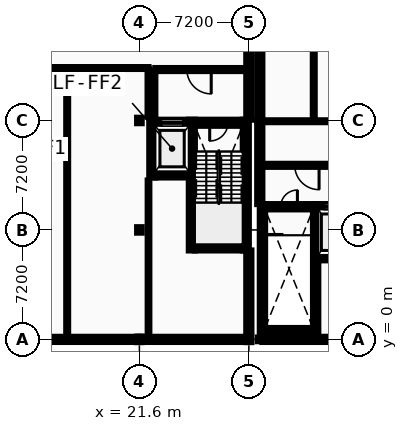
"""IFC4 building model, lengths in metres.
Left out: names, types, materials, properties, quantities, classifications, styles, units other than length and angle.
Written with IfcOpenShell. Run it as: python <this file> out.ifc"""

import sys

from ifc_helpers import new_model, si_unit, direction, frame, frame_2d, origin, origin_2d, place, context, subcontext, project, spatial, rectangle, i_section, extrude, element, fill, save


model = new_model("IFC4")
c1 = context("Model", 3, precision=1e-05, world=origin(), true_north=direction((0.0, 1.0)))
c2 = subcontext(c1, "Body", "Model", "MODEL_VIEW")
j1 = project(units=[si_unit("LENGTHUNIT", "METRE"), si_unit("PLANEANGLEUNIT", "RADIAN")], contexts=[c1])
p1 = place(None, origin())
s1 = spatial("IfcSite", under=j1, at=p1, CompositionType="ELEMENT")
p2 = place(p1, origin())
s2 = spatial("IfcBuilding", under=s1, at=p2, CompositionType="ELEMENT")
p3 = place(p2, frame((0.0, 0.0, 18.4)))
s3 = spatial("IfcBuildingStorey", under=s2, at=p3, CompositionType="ELEMENT", Elevation=18.4)
for number, where, z_axis, x_axis in (
    (1, (21.6, 0.0, 0.0), (0.0, 0.0, 1.0), (1.0, 0.0, 0.0)),
    (2, (21.6, 7.2, 0.0), (0.0, 0.0, 1.0), (1.0, 0.0, 0.0)),
    (3, (21.6, 14.4, 0.0), (0.0, 0.0, 1.0), (1.0, 0.0, 0.0)),
    (4, (28.8, 0.0, 0.0), (0.0, 0.0, 1.0), (1.0, 0.0, 0.0)),
):
    element("IfcColumn", number, at=place(p3, frame(where, z_axis=z_axis, x_axis=x_axis)), inside=s3, PredefinedType="COLUMN", context=c2, shape_type="SweptSolid", body=[
        extrude(i_section(OverallWidth=0.3, OverallDepth=0.36, WebThickness=0.012, FlangeThickness=0.022, FilletRadius=0.027, at=origin_2d()), origin(), (0.0, 0.0, 1.0), 4.4),
    ])
for number, where, z_axis, x_axis in (
    (5, (29.52, 0.0, 0.0), (0.0, 0.0, 1.0), (1.0, 0.0, 0.0)),
    (6, (29.52, 14.4, 0.0), (0.0, 0.0, 1.0), (1.0, 0.0, 0.0)),
):
    element("IfcColumn", number, at=place(p3, frame(where, z_axis=z_axis, x_axis=x_axis)), inside=s3, PredefinedType="COLUMN", context=c2, shape_type="SweptSolid", body=[
        extrude(i_section(OverallWidth=0.24, OverallDepth=0.24, WebThickness=0.01, FlangeThickness=0.017, FilletRadius=0.021, at=origin_2d()), origin(), (0.0, 0.0, 1.0), 4.4),
    ])
p4 = place(p3, frame((14.4, 0.0, 0.0), z_axis=(0.0, 0.0, 1.0), x_axis=(1.0, 0.0, 0.0)))
e7 = element("IfcWall", 7, at=p4, inside=s3, PredefinedType="STANDARD", context=c2, shape_type="SweptSolid", body=[
    extrude(rectangle(XDim=7.2, YDim=0.34, at=frame_2d((3.6, 0.0))), origin(), (0.0, 0.0, 1.0), 3.95),
])
p5 = place(p4, frame((4.44, 0.0, 0.95)))
e8 = element("IfcOpeningElement", 8, at=p5, cuts=e7, PredefinedType="OPENING", context=c2, shape_type="SweptSolid", body=[
    extrude(rectangle(XDim=1.2, YDim=1.368, at=frame_2d((0.6, 0.684))), frame((0.0, 0.18, 0.0), z_axis=(0.0, -1.0, 0.0), x_axis=(1.0, 0.0, 0.0)), (0.0, 0.0, 1.0), 0.36),
])
p6 = place(p3, frame((21.6, 0.0, 0.0), z_axis=(0.0, 0.0, 1.0), x_axis=(1.0, 0.0, 0.0)))
e9 = element("IfcWall", 9, at=p6, inside=s3, PredefinedType="STANDARD", context=c2, shape_type="SweptSolid", body=[
    extrude(rectangle(XDim=7.03, YDim=0.34, at=frame_2d((3.515, 0.0))), origin(), (0.0, 0.0, 1.0), 3.95),
])
p7 = place(p6, frame((1.492, 0.0, 0.95)))
e10 = element("IfcOpeningElement", 10, at=p7, cuts=e9, PredefinedType="OPENING", context=c2, shape_type="SweptSolid", body=[
    extrude(rectangle(XDim=1.234, YDim=1.368, at=frame_2d((0.617, 0.684))), frame((0.0, 0.18, 0.0), z_axis=(0.0, -1.0, 0.0), x_axis=(1.0, 0.0, 0.0)), (0.0, 0.0, 1.0), 0.36),
])
p8 = place(p6, frame((4.304, 0.0, 0.95)))
e11 = element("IfcOpeningElement", 11, at=p8, cuts=e9, PredefinedType="OPENING", context=c2, shape_type="SweptSolid", body=[
    extrude(rectangle(XDim=1.234, YDim=1.368, at=frame_2d((0.617, 0.684))), frame((0.0, 0.18, 0.0), z_axis=(0.0, -1.0, 0.0), x_axis=(1.0, 0.0, 0.0)), (0.0, 0.0, 1.0), 0.36),
])
p9 = place(p3, frame((28.8, -0.17, 0.0), z_axis=(0.0, 0.0, 1.0), x_axis=(0.0, 1.0, 0.0)))
e12 = element("IfcWall", 12, at=p9, inside=s3, PredefinedType="STANDARD", context=c2, shape_type="SweptSolid", body=[
    extrude(rectangle(XDim=6.02, YDim=0.34, at=frame_2d((3.01, 0.0))), origin(), (0.0, 0.0, 1.0), 4.215),
])
p10 = place(p9, frame((2.461, 0.0, 0.95)))
e13 = element("IfcOpeningElement", 13, at=p10, cuts=e12, PredefinedType="OPENING", context=c2, shape_type="SweptSolid", body=[
    extrude(rectangle(XDim=1.098, YDim=1.404, at=frame_2d((0.549, 0.702))), frame((0.0, 0.18, 0.0), z_axis=(0.0, -1.0, 0.0), x_axis=(1.0, 0.0, 0.0)), (0.0, 0.0, 1.0), 0.36),
])
p11 = place(p3, frame((28.8, 14.45, 0.0), z_axis=(0.0, 0.0, 1.0), x_axis=(0.0, 1.0, 0.0)))
e14 = element("IfcWall", 14, at=p11, inside=s3, PredefinedType="STANDARD", context=c2, shape_type="SweptSolid", body=[
    extrude(rectangle(XDim=7.15, YDim=0.34, at=frame_2d((3.575, 0.0))), origin(), (0.0, 0.0, 1.0), 4.215),
])
p12 = place(p11, frame((1.579, 0.0, 0.95)))
e15 = element("IfcOpeningElement", 15, at=p12, cuts=e14, PredefinedType="OPENING", context=c2, shape_type="SweptSolid", body=[
    extrude(rectangle(XDim=1.132, YDim=1.404, at=frame_2d((0.566, 0.702))), frame((0.0, 0.18, 0.0), z_axis=(0.0, -1.0, 0.0), x_axis=(1.0, 0.0, 0.0)), (0.0, 0.0, 1.0), 0.36),
])
p13 = place(p11, frame((4.439, 0.0, 0.95)))
e16 = element("IfcOpeningElement", 16, at=p13, cuts=e14, PredefinedType="OPENING", context=c2, shape_type="SweptSolid", body=[
    extrude(rectangle(XDim=1.132, YDim=1.404, at=frame_2d((0.566, 0.702))), frame((0.0, 0.18, 0.0), z_axis=(0.0, -1.0, 0.0), x_axis=(1.0, 0.0, 0.0)), (0.0, 0.0, 1.0), 0.36),
])
p14 = place(p3, frame((29.69, 0.0, 0.0), z_axis=(0.0, 0.0, 1.0), x_axis=(1.0, 0.0, 0.0)))
e17 = element("IfcWall", 17, at=p14, inside=s3, PredefinedType="STANDARD", context=c2, shape_type="SweptSolid", body=[
    extrude(rectangle(XDim=6.42, YDim=0.34, at=frame_2d((3.21, 0.0))), origin(), (0.0, 0.0, 1.0), 4.035),
])
p15 = place(p3, frame((29.52, 14.4, 0.0), z_axis=(0.0, 0.0, 1.0), x_axis=(0.0, -1.0, 0.0)))
e18 = element("IfcWall", 18, at=p15, inside=s3, PredefinedType="STANDARD", context=c2, shape_type="SweptSolid", body=[
    extrude(rectangle(XDim=5.5, YDim=0.34, at=frame_2d((2.75, 0.0))), origin(), (0.0, 0.0, 1.0), 4.11),
])
p16 = place(p3, frame((29.52, 21.77, 0.0), z_axis=(0.0, 0.0, 1.0), x_axis=(0.0, -1.0, 0.0)))
e19 = element("IfcWall", 19, at=p16, inside=s3, PredefinedType="STANDARD", context=c2, shape_type="SweptSolid", body=[
    extrude(rectangle(XDim=7.37, YDim=0.34, at=frame_2d((3.685, 0.0))), origin(), (0.0, 0.0, 1.0), 4.11),
])
p17 = place(p16, frame((1.577, 0.0, 0.95)))
e20 = element("IfcOpeningElement", 20, at=p17, cuts=e19, PredefinedType="OPENING", context=c2, shape_type="SweptSolid", body=[
    extrude(rectangle(XDim=1.268, YDim=1.404, at=frame_2d((0.634, 0.702))), frame((0.0, 0.18, 0.0), z_axis=(0.0, -1.0, 0.0), x_axis=(1.0, 0.0, 0.0)), (0.0, 0.0, 1.0), 0.36),
])
p18 = place(p16, frame((4.525, 0.0, 0.95)))
e21 = element("IfcOpeningElement", 21, at=p18, cuts=e19, PredefinedType="OPENING", context=c2, shape_type="SweptSolid", body=[
    extrude(rectangle(XDim=1.268, YDim=1.404, at=frame_2d((0.634, 0.702))), frame((0.0, 0.18, 0.0), z_axis=(0.0, -1.0, 0.0), x_axis=(1.0, 0.0, 0.0)), (0.0, 0.0, 1.0), 0.36),
])
p19 = place(p3, frame((25.25, 6.05, 0.0), z_axis=(0.0, 0.0, 1.0), x_axis=(1.0, 0.0, 0.0)))
e22 = element("IfcWall", 22, at=p19, inside=s3, PredefinedType="SHEAR", context=c2, shape_type="SweptSolid", body=[
    extrude(rectangle(XDim=3.15, YDim=0.4, at=frame_2d((1.575, 0.0))), origin(), (0.0, 0.0, 1.0), 4.215),
])
p20 = place(p3, frame((25.25, 14.25, 0.0), z_axis=(0.0, 0.0, 1.0), x_axis=(1.0, 0.0, 0.0)))
e23 = element("IfcWall", 23, at=p20, inside=s3, PredefinedType="SHEAR", context=c2, shape_type="SweptSolid", body=[
    extrude(rectangle(XDim=3.15, YDim=0.4, at=frame_2d((1.575, 0.0))), origin(), (0.0, 0.0, 1.0), 4.215),
])
p21 = place(p20, frame((0.975, 0.0, 0.0)))
e24 = element("IfcOpeningElement", 24, at=p21, cuts=e23, PredefinedType="OPENING", context=c2, shape_type="SweptSolid", body=[
    extrude(rectangle(XDim=1.2, YDim=2.15, at=frame_2d((0.6, 1.075))), frame((0.0, 0.21, 0.0), z_axis=(0.0, -1.0, 0.0), x_axis=(1.0, 0.0, 0.0)), (0.0, 0.0, 1.0), 0.42),
])
for number, where, z_axis, x_axis in (
    (25, (25.05, 5.85, 0.0), (0.0, 0.0, 1.0), (0.0, 1.0, 0.0)),
    (26, (28.6, 5.85, 0.0), (0.0, 0.0, 1.0), (0.0, 1.0, 0.0)),
):
    element("IfcWall", number, at=place(p3, frame(where, z_axis=z_axis, x_axis=x_axis)), inside=s3, PredefinedType="SHEAR", context=c2, shape_type="SweptSolid", body=[
        extrude(rectangle(XDim=8.6, YDim=0.4, at=frame_2d((4.3, 0.0))), origin(), (0.0, 0.0, 1.0), 4.215),
    ])
p22 = place(p3, frame((22.65, 10.85, 0.0), z_axis=(0.0, 0.0, 1.0), x_axis=(1.0, 0.0, 0.0)))
e27 = element("IfcWall", 27, at=p22, inside=s3, PredefinedType="SHEAR", context=c2, shape_type="SweptSolid", body=[
    extrude(rectangle(XDim=2.2, YDim=0.4, at=frame_2d((1.1, 0.0))), origin(), (0.0, 0.0, 1.0), 4.215),
])
p23 = place(p3, frame((22.65, 14.25, 0.0), z_axis=(0.0, 0.0, 1.0), x_axis=(1.0, 0.0, 0.0)))
e28 = element("IfcWall", 28, at=p23, inside=s3, PredefinedType="SHEAR", context=c2, shape_type="SweptSolid", body=[
    extrude(rectangle(XDim=2.2, YDim=0.4, at=frame_2d((1.1, 0.0))), origin(), (0.0, 0.0, 1.0), 4.215),
])
p24 = place(p23, frame((0.4, 0.0, 0.0)))
e29 = element("IfcOpeningElement", 29, at=p24, cuts=e28, PredefinedType="OPENING", context=c2, shape_type="SweptSolid", body=[
    extrude(rectangle(XDim=1.4, YDim=2.2, at=frame_2d((0.7, 1.1))), frame((0.0, 0.21, 0.0), z_axis=(0.0, -1.0, 0.0), x_axis=(1.0, 0.0, 0.0)), (0.0, 0.0, 1.0), 0.42),
])
p25 = place(p3, frame((22.45, 10.65, 0.0), z_axis=(0.0, 0.0, 1.0), x_axis=(0.0, 1.0, 0.0)))
e30 = element("IfcWall", 30, at=p25, inside=s3, PredefinedType="SHEAR", context=c2, shape_type="SweptSolid", body=[
    extrude(rectangle(XDim=3.8, YDim=0.4, at=frame_2d((1.9, 0.0))), origin(), (0.0, 0.0, 1.0), 4.215),
])
p26 = place(p3, frame((22.65, 17.75, 0.0), z_axis=(0.0, 0.0, 1.0), x_axis=(1.0, 0.0, 0.0)))
e31 = element("IfcWall", 31, at=p26, inside=s3, PredefinedType="PARTITIONING", context=c2, shape_type="SweptSolid", body=[
    extrude(rectangle(XDim=5.75, YDim=0.2, at=frame_2d((2.875, 0.0))), origin(), (0.0, 0.0, 1.0), 4.215),
])
p27 = place(p26, frame((2.075, 0.0, 0.0)))
e32 = element("IfcOpeningElement", 32, at=p27, cuts=e31, PredefinedType="OPENING", context=c2, shape_type="SweptSolid", body=[
    extrude(rectangle(XDim=1.6, YDim=2.2, at=frame_2d((0.8, 1.1))), frame((0.0, 0.11, 0.0), z_axis=(0.0, -1.0, 0.0), x_axis=(1.0, 0.0, 0.0)), (0.0, 0.0, 1.0), 0.22),
])
p28 = place(p3, frame((22.55, 14.45, 0.0), z_axis=(0.0, 0.0, 1.0), x_axis=(0.0, 1.0, 0.0)))
e33 = element("IfcWall", 33, at=p28, inside=s3, PredefinedType="PARTITIONING", context=c2, shape_type="SweptSolid", body=[
    extrude(rectangle(XDim=3.2, YDim=0.2, at=frame_2d((1.6, 0.0))), origin(), (0.0, 0.0, 1.0), 4.215),
])
p29 = place(p3, frame((29.87, 0.575, 0.0), z_axis=(0.0, 0.0, 1.0), x_axis=(1.0, 0.0, 0.0)))
e34 = element("IfcWall", 34, at=p29, inside=s3, PredefinedType="SHEAR", context=c2, shape_type="SweptSolid", body=[
    extrude(rectangle(XDim=3.15, YDim=0.35, at=frame_2d((1.575, 0.0))), origin(), (0.0, 0.0, 1.0), 4.18),
])
p30 = place(p3, frame((29.87, 8.725, 0.0), z_axis=(0.0, 0.0, 1.0), x_axis=(1.0, 0.0, 0.0)))
e35 = element("IfcWall", 35, at=p30, inside=s3, PredefinedType="SHEAR", context=c2, shape_type="SweptSolid", body=[
    extrude(rectangle(XDim=3.15, YDim=0.35, at=frame_2d((1.575, 0.0))), origin(), (0.0, 0.0, 1.0), 4.18),
])
p31 = place(p30, frame((1.025, 0.0, 0.0)))
e36 = element("IfcOpeningElement", 36, at=p31, cuts=e35, PredefinedType="OPENING", context=c2, shape_type="SweptSolid", body=[
    extrude(rectangle(XDim=1.1, YDim=2.15, at=frame_2d((0.55, 1.075))), frame((0.0, 0.185, 0.0), z_axis=(0.0, -1.0, 0.0), x_axis=(1.0, 0.0, 0.0)), (0.0, 0.0, 1.0), 0.37),
])
p32 = place(p3, frame((29.695, 0.34, 0.0), z_axis=(0.0, 0.0, 1.0), x_axis=(0.0, 1.0, 0.0)))
e37 = element("IfcWall", 37, at=p32, inside=s3, PredefinedType="SHEAR", context=c2, shape_type="SweptSolid", body=[
    extrude(rectangle(XDim=8.56, YDim=0.35, at=frame_2d((4.28, 0.0))), origin(), (0.0, 0.0, 1.0), 4.18),
])
p33 = place(p3, frame((33.195, 0.4, 0.0), z_axis=(0.0, 0.0, 1.0), x_axis=(0.0, 1.0, 0.0)))
e38 = element("IfcWall", 38, at=p33, inside=s3, PredefinedType="SHEAR", context=c2, shape_type="SweptSolid", body=[
    extrude(rectangle(XDim=8.5, YDim=0.35, at=frame_2d((4.25, 0.0))), origin(), (0.0, 0.0, 1.0), 4.18),
])
p34 = place(p3, frame((33.37, 5.375, 0.0), z_axis=(0.0, 0.0, 1.0), x_axis=(1.0, 0.0, 0.0)))
e39 = element("IfcWall", 39, at=p34, inside=s3, PredefinedType="SHEAR", context=c2, shape_type="SweptSolid", body=[
    extrude(rectangle(XDim=2.0, YDim=0.35, at=frame_2d((1.0, 0.0))), origin(), (0.0, 0.0, 1.0), 4.18),
])
p35 = place(p3, frame((33.37, 8.725, 0.0), z_axis=(0.0, 0.0, 1.0), x_axis=(1.0, 0.0, 0.0)))
e40 = element("IfcWall", 40, at=p35, inside=s3, PredefinedType="SHEAR", context=c2, shape_type="SweptSolid", body=[
    extrude(rectangle(XDim=2.0, YDim=0.35, at=frame_2d((1.0, 0.0))), origin(), (0.0, 0.0, 1.0), 4.18),
])
p36 = place(p35, frame((0.4, 0.0, 0.0)))
e41 = element("IfcOpeningElement", 41, at=p36, cuts=e40, PredefinedType="OPENING", context=c2, shape_type="SweptSolid", body=[
    extrude(rectangle(XDim=1.2, YDim=2.2, at=frame_2d((0.6, 1.1))), frame((0.0, 0.185, 0.0), z_axis=(0.0, -1.0, 0.0), x_axis=(1.0, 0.0, 0.0)), (0.0, 0.0, 1.0), 0.37),
])
p37 = place(p3, frame((29.87, 11.45, 0.0), z_axis=(0.0, 0.0, 1.0), x_axis=(1.0, 0.0, 0.0)))
e42 = element("IfcWall", 42, at=p37, inside=s3, PredefinedType="PARTITIONING", context=c2, shape_type="SweptSolid", body=[
    extrude(rectangle(XDim=5.5, YDim=0.2, at=frame_2d((2.75, 0.0))), origin(), (0.0, 0.0, 1.0), 4.18),
])
p38 = place(p37, frame((1.95, 0.0, 0.0)))
e43 = element("IfcOpeningElement", 43, at=p38, cuts=e42, PredefinedType="OPENING", context=c2, shape_type="SweptSolid", body=[
    extrude(rectangle(XDim=1.6, YDim=2.2, at=frame_2d((0.8, 1.1))), frame((0.0, 0.11, 0.0), z_axis=(0.0, -1.0, 0.0), x_axis=(1.0, 0.0, 0.0)), (0.0, 0.0, 1.0), 0.22),
])
p39 = place(p3, frame((29.9, 14.35, 0.0), z_axis=(0.0, 0.0, 1.0), x_axis=(1.0, 0.0, 0.0)))
e44 = element("IfcWall", 44, at=p39, inside=s3, PredefinedType="PARTITIONING", context=c2, shape_type="SweptSolid", body=[
    extrude(rectangle(XDim=5.72, YDim=0.125, at=frame_2d((2.86, 0.0))), origin(), (0.0, 0.0, 1.0), 4.035),
])
p40 = place(p39, frame((1.72, 0.0, 0.0)))
e45 = element("IfcOpeningElement", 45, at=p40, cuts=e44, PredefinedType="OPENING", context=c2, shape_type="SweptSolid", body=[
    extrude(rectangle(XDim=1.0, YDim=2.1, at=frame_2d((0.5, 1.05))), frame((0.0, 0.073, 0.0), z_axis=(0.0, -1.0, 0.0), x_axis=(1.0, 0.0, 0.0)), (0.0, 0.0, 1.0), 0.145),
])
p41 = place(p3, frame((9.45, 17.85, 0.0), z_axis=(0.0, 0.0, 1.0), x_axis=(1.0, 0.0, 0.0)))
e46 = element("IfcWall", 46, at=p41, inside=s3, PredefinedType="PARTITIONING", context=c2, shape_type="SweptSolid", body=[
    extrude(rectangle(XDim=12.75, YDim=0.125, at=frame_2d((6.375, 0.0))), origin(), (0.0, 0.0, 1.0), 4.215),
])
p42 = place(p41, frame((7.85, 0.0, 0.0)))
e47 = element("IfcOpeningElement", 47, at=p42, cuts=e46, PredefinedType="OPENING", context=c2, shape_type="SweptSolid", body=[
    extrude(rectangle(XDim=1.0, YDim=2.1, at=frame_2d((0.5, 1.05))), frame((0.0, 0.073, 0.0), z_axis=(0.0, -1.0, 0.0), x_axis=(1.0, 0.0, 0.0)), (0.0, 0.0, 1.0), 0.145),
])
p43 = place(p41, frame((0.45, 0.0, 0.0)))
e48 = element("IfcOpeningElement", 48, at=p43, cuts=e46, PredefinedType="OPENING", context=c2, shape_type="SweptSolid", body=[
    extrude(rectangle(XDim=0.9, YDim=2.1, at=frame_2d((0.45, 1.05))), frame((0.0, 0.073, 0.0), z_axis=(0.0, -1.0, 0.0), x_axis=(1.0, 0.0, 0.0)), (0.0, 0.0, 1.0), 0.145),
])
p44 = place(p3, frame((16.85, 0.2, 0.0), z_axis=(0.0, 0.0, 1.0), x_axis=(0.0, 1.0, 0.0)))
e49 = element("IfcWall", 49, at=p44, inside=s3, PredefinedType="PARTITIONING", context=c2, shape_type="SweptSolid", body=[
    extrude(rectangle(XDim=17.588, YDim=0.125, at=frame_2d((8.794, 0.0))), origin(), (0.0, 0.0, 1.0), 3.96),
])
p45 = place(p3, frame((22.2, 0.2, 0.0), z_axis=(0.0, 0.0, 1.0), x_axis=(0.0, 1.0, 0.0)))
e50 = element("IfcWall", 50, at=p45, inside=s3, PredefinedType="PARTITIONING", context=c2, shape_type="SweptSolid", body=[
    extrude(rectangle(XDim=10.25, YDim=0.11, at=frame_2d((5.125, 0.0))), origin(), (0.0, 0.0, 1.0), 4.215),
])
p46 = place(p3, frame((22.2, 14.65, 0.0), z_axis=(0.0, 0.0, 1.0), x_axis=(0.0, 1.0, 0.0)))
e51 = element("IfcWall", 51, at=p46, inside=s3, PredefinedType="PARTITIONING", context=c2, shape_type="SweptSolid", body=[
    extrude(rectangle(XDim=3.138, YDim=0.125, at=frame_2d((1.569, 0.0))), origin(), (0.0, 0.0, 1.0), 4.215),
])
p47 = place(p3, frame((33.07, 14.413, 0.0), z_axis=(0.0, 0.0, 1.0), x_axis=(0.0, 1.0, 0.0)))
e52 = element("IfcWall", 52, at=p47, inside=s3, PredefinedType="PARTITIONING", context=c2, shape_type="SweptSolid", body=[
    extrude(rectangle(XDim=6.987, YDim=0.125, at=frame_2d((3.494, 0.0))), origin(), (0.0, 0.0, 1.0), 4.18),
])
p48 = place(p5, origin())
e53 = element("IfcWindow", 53, at=p48, inside=s3, PartitioningType="SINGLE_PANEL", PredefinedType="WINDOW", context=c2, shape_type="SweptSolid", body=[
    extrude(rectangle(XDim=1.2, YDim=1.368, at=frame_2d((0.6, 0.684))), frame((0.0, 0.03, 0.0), z_axis=(0.0, -1.0, 0.0), x_axis=(1.0, 0.0, 0.0)), (0.0, 0.0, 1.0), 0.06),
])
fill(e8, e53)
p49 = place(p7, origin())
e54 = element("IfcWindow", 54, at=p49, inside=s3, PartitioningType="SINGLE_PANEL", PredefinedType="WINDOW", context=c2, shape_type="SweptSolid", body=[
    extrude(rectangle(XDim=1.234, YDim=1.368, at=frame_2d((0.617, 0.684))), frame((0.0, 0.03, 0.0), z_axis=(0.0, -1.0, 0.0), x_axis=(1.0, 0.0, 0.0)), (0.0, 0.0, 1.0), 0.06),
])
fill(e10, e54)
p50 = place(p8, origin())
e55 = element("IfcWindow", 55, at=p50, inside=s3, PartitioningType="SINGLE_PANEL", PredefinedType="WINDOW", context=c2, shape_type="SweptSolid", body=[
    extrude(rectangle(XDim=1.234, YDim=1.368, at=frame_2d((0.617, 0.684))), frame((0.0, 0.03, 0.0), z_axis=(0.0, -1.0, 0.0), x_axis=(1.0, 0.0, 0.0)), (0.0, 0.0, 1.0), 0.06),
])
fill(e11, e55)
p51 = place(p10, origin())
e56 = element("IfcWindow", 56, at=p51, inside=s3, PartitioningType="SINGLE_PANEL", PredefinedType="WINDOW", context=c2, shape_type="SweptSolid", body=[
    extrude(rectangle(XDim=1.098, YDim=1.404, at=frame_2d((0.549, 0.702))), frame((0.0, 0.03, 0.0), z_axis=(0.0, -1.0, 0.0), x_axis=(1.0, 0.0, 0.0)), (0.0, 0.0, 1.0), 0.06),
])
fill(e13, e56)
p52 = place(p12, origin())
e57 = element("IfcWindow", 57, at=p52, inside=s3, PartitioningType="SINGLE_PANEL", PredefinedType="WINDOW", context=c2, shape_type="SweptSolid", body=[
    extrude(rectangle(XDim=1.132, YDim=1.404, at=frame_2d((0.566, 0.702))), frame((0.0, 0.03, 0.0), z_axis=(0.0, -1.0, 0.0), x_axis=(1.0, 0.0, 0.0)), (0.0, 0.0, 1.0), 0.06),
])
fill(e15, e57)
p53 = place(p18, origin())
e58 = element("IfcWindow", 58, at=p53, inside=s3, PartitioningType="SINGLE_PANEL", PredefinedType="WINDOW", context=c2, shape_type="SweptSolid", body=[
    extrude(rectangle(XDim=1.268, YDim=1.404, at=frame_2d((0.634, 0.702))), frame((0.0, 0.03, 0.0), z_axis=(0.0, -1.0, 0.0), x_axis=(1.0, 0.0, 0.0)), (0.0, 0.0, 1.0), 0.06),
])
fill(e21, e58)
p54 = place(p21, frame((1.2, 0.0, 0.0), z_axis=(0.0, 0.0, 1.0), x_axis=(-1.0, 0.0, 0.0)))
e59 = element("IfcDoor", 59, at=p54, inside=s3, OperationType="SINGLE_SWING_LEFT", PredefinedType="DOOR", context=c2, shape_type="SweptSolid", body=[
    extrude(rectangle(XDim=1.2, YDim=2.15, at=frame_2d((0.6, 1.075))), frame((0.0, 0.025, 0.0), z_axis=(0.0, -1.0, 0.0), x_axis=(1.0, 0.0, 0.0)), (0.0, 0.0, 1.0), 0.05),
])
fill(e24, e59)
p55 = place(p24, origin())
e60 = element("IfcDoor", 60, at=p55, inside=s3, OperationType="SLIDING_TO_LEFT", PredefinedType="DOOR", context=c2, shape_type="SweptSolid", body=[
    extrude(rectangle(XDim=1.4, YDim=2.2, at=frame_2d((0.7, 1.1))), frame((0.0, 0.025, 0.0), z_axis=(0.0, -1.0, 0.0), x_axis=(1.0, 0.0, 0.0)), (0.0, 0.0, 1.0), 0.05),
])
fill(e29, e60)
p56 = place(p27, origin())
e61 = element("IfcDoor", 61, at=p56, inside=s3, OperationType="DOUBLE_DOOR_SINGLE_SWING", PredefinedType="DOOR", context=c2, shape_type="SweptSolid", body=[
    extrude(rectangle(XDim=1.6, YDim=2.2, at=frame_2d((0.8, 1.1))), frame((0.0, 0.025, 0.0), z_axis=(0.0, -1.0, 0.0), x_axis=(1.0, 0.0, 0.0)), (0.0, 0.0, 1.0), 0.05),
])
fill(e32, e61)
p57 = place(p31, frame((1.1, 0.0, 0.0), z_axis=(0.0, 0.0, 1.0), x_axis=(-1.0, 0.0, 0.0)))
e62 = element("IfcDoor", 62, at=p57, inside=s3, OperationType="SINGLE_SWING_RIGHT", PredefinedType="DOOR", context=c2, shape_type="SweptSolid", body=[
    extrude(rectangle(XDim=1.1, YDim=2.15, at=frame_2d((0.55, 1.075))), frame((0.0, 0.025, 0.0), z_axis=(0.0, -1.0, 0.0), x_axis=(1.0, 0.0, 0.0)), (0.0, 0.0, 1.0), 0.05),
])
fill(e36, e62)
p58 = place(p36, origin())
e63 = element("IfcDoor", 63, at=p58, inside=s3, OperationType="SLIDING_TO_RIGHT", PredefinedType="DOOR", context=c2, shape_type="SweptSolid", body=[
    extrude(rectangle(XDim=1.2, YDim=2.2, at=frame_2d((0.6, 1.1))), frame((0.0, 0.025, 0.0), z_axis=(0.0, -1.0, 0.0), x_axis=(1.0, 0.0, 0.0)), (0.0, 0.0, 1.0), 0.05),
])
fill(e41, e63)
p59 = place(p38, origin())
e64 = element("IfcDoor", 64, at=p59, inside=s3, OperationType="DOUBLE_DOOR_SINGLE_SWING", PredefinedType="DOOR", context=c2, shape_type="SweptSolid", body=[
    extrude(rectangle(XDim=1.6, YDim=2.2, at=frame_2d((0.8, 1.1))), frame((0.0, 0.025, 0.0), z_axis=(0.0, -1.0, 0.0), x_axis=(1.0, 0.0, 0.0)), (0.0, 0.0, 1.0), 0.05),
])
fill(e43, e64)
p60 = place(p42, origin())
e65 = element("IfcDoor", 65, at=p60, inside=s3, OperationType="SLIDING_TO_LEFT", PredefinedType="DOOR", context=c2, shape_type="SweptSolid", body=[
    extrude(rectangle(XDim=1.0, YDim=2.1, at=frame_2d((0.5, 1.05))), frame((0.0, 0.025, 0.0), z_axis=(0.0, -1.0, 0.0), x_axis=(1.0, 0.0, 0.0)), (0.0, 0.0, 1.0), 0.05),
])
fill(e47, e65)
p61 = place(p40, frame((1.0, 0.0, 0.0), z_axis=(0.0, 0.0, 1.0), x_axis=(-1.0, 0.0, 0.0)))
e66 = element("IfcDoor", 66, at=p61, inside=s3, OperationType="SLIDING_TO_LEFT", PredefinedType="DOOR", context=c2, shape_type="SweptSolid", body=[
    extrude(rectangle(XDim=1.0, YDim=2.1, at=frame_2d((0.5, 1.05))), frame((0.0, 0.025, 0.0), z_axis=(0.0, -1.0, 0.0), x_axis=(1.0, 0.0, 0.0)), (0.0, 0.0, 1.0), 0.05),
])
fill(e45, e66)
save(model, sys.argv[1])
